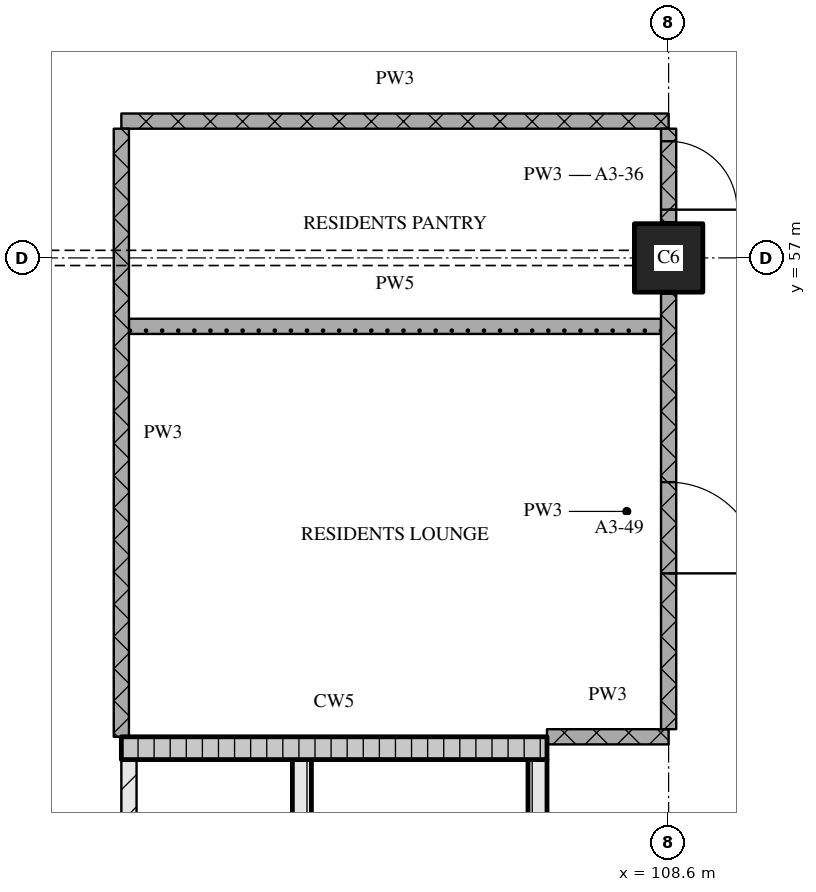
"""IFC4 building model, lengths in metres.
Left out: names, types, materials, properties, quantities, classifications, styles, units other than length and angle.
Written with IfcOpenShell. Run it as: python <this file> out.ifc"""

import sys

from ifc_helpers import new_model, si_unit, direction, frame, frame_2d, origin, origin_2d, place, context, subcontext, project, spatial, rectangle, extrude, element, fill, save


model = new_model("IFC4")
c1 = context("Model", 3, precision=1e-05, world=origin(), true_north=direction((0.0, 1.0)))
c2 = subcontext(c1, "Body", "Model", "MODEL_VIEW")
j1 = project(units=[si_unit("LENGTHUNIT", "METRE"), si_unit("PLANEANGLEUNIT", "RADIAN")], contexts=[c1])
p1 = place(None, origin())
s1 = spatial("IfcSite", under=j1, at=p1, CompositionType="ELEMENT")
p2 = place(p1, origin())
s2 = spatial("IfcBuilding", under=s1, at=p2, CompositionType="ELEMENT")
p3 = place(p2, frame((0.0, 0.0, 58.8)))
s3 = spatial("IfcBuildingStorey", under=s2, at=p3, CompositionType="ELEMENT", Elevation=58.8)
p4 = place(p3, frame((108.6, 57.0, 0.0), z_axis=(0.0, 0.0, 1.0), x_axis=(1.0, 0.0, 0.0)))
e1 = element("IfcColumn", 1, at=p4, inside=s3, PredefinedType="COLUMN", context=c2, shape_type="SweptSolid", body=[
    extrude(rectangle(XDim=0.9, YDim=0.9, at=origin_2d()), origin(), (0.0, 0.0, 1.0), 3.6),
])
p5 = place(p3, frame((101.5, 43.5, 0.0), z_axis=(0.0, 0.0, 1.0), x_axis=(0.0, 1.0, 0.0)))
e2 = element("IfcWall", 2, at=p5, inside=s3, PredefinedType="PARTITIONING", context=c2, shape_type="SweptSolid", body=[
    extrude(rectangle(XDim=6.9, YDim=0.2, at=frame_2d((3.45, 0.0))), origin(), (0.0, 0.0, 1.0), 3.32),
])
p6 = place(p5, frame((1.0, 0.0, 0.0)))
e3 = element("IfcOpeningElement", 3, at=p6, cuts=e2, PredefinedType="OPENING", context=c2, shape_type="SweptSolid", body=[
    extrude(rectangle(XDim=1.0, YDim=2.1, at=frame_2d((0.5, 1.05))), frame((0.0, 0.11, 0.0), z_axis=(0.0, -1.0, 0.0), x_axis=(1.0, 0.0, 0.0)), (0.0, 0.0, 1.0), 0.22),
])
p7 = place(p3, frame((103.775, 43.5, 0.0), z_axis=(0.0, 0.0, 1.0), x_axis=(0.0, 1.0, 0.0)))
e4 = element("IfcWall", 4, at=p7, inside=s3, PredefinedType="SOLIDWALL", context=c2, shape_type="SweptSolid", body=[
    extrude(rectangle(XDim=6.9, YDim=0.25, at=frame_2d((3.45, 0.0))), origin(), (0.0, 0.0, 1.0), 3.32),
])
p8 = place(p7, frame((0.2, 0.0, 0.0)))
e5 = element("IfcOpeningElement", 5, at=p8, cuts=e4, PredefinedType="OPENING", context=c2, shape_type="SweptSolid", body=[
    extrude(rectangle(XDim=1.0, YDim=2.1, at=frame_2d((0.5, 1.05))), frame((0.0, 0.135, 0.0), z_axis=(0.0, -1.0, 0.0), x_axis=(1.0, 0.0, 0.0)), (0.0, 0.0, 1.0), 0.27),
])
p9 = place(p3, frame((106.875, 43.5, 0.0), z_axis=(0.0, 0.0, 1.0), x_axis=(0.0, 1.0, 0.0)))
e6 = element("IfcWall", 6, at=p9, inside=s3, PredefinedType="SOLIDWALL", context=c2, shape_type="SweptSolid", body=[
    extrude(rectangle(XDim=6.9, YDim=0.25, at=frame_2d((3.45, 0.0))), origin(), (0.0, 0.0, 1.0), 3.32),
])
p10 = place(p3, frame((101.4, 50.55, 0.0), z_axis=(0.0, 0.0, 1.0), x_axis=(1.0, 0.0, 0.0)))
e7 = element("IfcWall", 7, at=p10, inside=s3, PredefinedType="SOLIDWALL", context=c2, shape_type="SweptSolid", body=[
    extrude(rectangle(XDim=5.6, YDim=0.3, at=frame_2d((2.8, 0.0))), origin(), (0.0, 0.0, 1.0), 3.32),
])
p11 = place(p3, frame((107.0, 50.7, 0.0), z_axis=(0.0, 0.0, 1.0), x_axis=(1.0, 0.0, 0.0)))
e8 = element("IfcWall", 8, at=p11, inside=s3, PredefinedType="PARTITIONING", context=c2, shape_type="SweptSolid", body=[
    extrude(rectangle(XDim=1.6, YDim=0.2, at=frame_2d((0.8, 0.0))), origin(), (0.0, 0.0, 1.0), 3.32),
])
p12 = place(p3, frame((101.5, 56.1, 0.0), z_axis=(0.0, 0.0, 1.0), x_axis=(1.0, 0.0, 0.0)))
e9 = element("IfcWall", 9, at=p12, inside=s3, PredefinedType="PARTITIONING", context=c2, shape_type="SweptSolid", body=[
    extrude(rectangle(XDim=7.0, YDim=0.2, at=frame_2d((3.5, 0.0))), origin(), (0.0, 0.0, 1.0), 3.32),
])
p13 = place(p3, frame((101.4, 58.8, 0.0), z_axis=(0.0, 0.0, 1.0), x_axis=(1.0, 0.0, 0.0)))
e10 = element("IfcWall", 10, at=p13, inside=s3, PredefinedType="PARTITIONING", context=c2, shape_type="SweptSolid", body=[
    extrude(rectangle(XDim=7.2, YDim=0.2, at=frame_2d((3.6, 0.0))), origin(), (0.0, 0.0, 1.0), 3.32),
])
p14 = place(p3, frame((101.4, 58.7, 0.0), z_axis=(0.0, 0.0, 1.0), x_axis=(0.0, -1.0, 0.0)))
e11 = element("IfcWall", 11, at=p14, inside=s3, PredefinedType="PARTITIONING", context=c2, shape_type="SweptSolid", body=[
    extrude(rectangle(XDim=8.0, YDim=0.2, at=frame_2d((4.0, 0.0))), origin(), (0.0, 0.0, 1.0), 3.32),
])
p15 = place(p3, frame((108.6, 50.8, 0.0), z_axis=(0.0, 0.0, 1.0), x_axis=(0.0, 1.0, 0.0)))
e12 = element("IfcWall", 12, at=p15, inside=s3, PredefinedType="PARTITIONING", context=c2, shape_type="SweptSolid", body=[
    extrude(rectangle(XDim=5.73, YDim=0.2, at=frame_2d((2.865, 0.0))), origin(), (0.0, 0.0, 1.0), 3.32),
])
p16 = place(p15, frame((2.05, 0.0, 0.0)))
e13 = element("IfcOpeningElement", 13, at=p16, cuts=e12, PredefinedType="OPENING", context=c2, shape_type="SweptSolid", body=[
    extrude(rectangle(XDim=1.2, YDim=2.1, at=frame_2d((0.6, 1.05))), frame((0.0, 0.11, 0.0), z_axis=(0.0, -1.0, 0.0), x_axis=(1.0, 0.0, 0.0)), (0.0, 0.0, 1.0), 0.22),
])
p17 = place(p3, frame((108.6, 57.47, 0.0), z_axis=(0.0, 0.0, 1.0), x_axis=(0.0, 1.0, 0.0)))
e14 = element("IfcWall", 14, at=p17, inside=s3, PredefinedType="PARTITIONING", context=c2, shape_type="SweptSolid", body=[
    extrude(rectangle(XDim=1.23, YDim=0.2, at=frame_2d((0.615, 0.0))), origin(), (0.0, 0.0, 1.0), 3.32),
])
p18 = place(p17, frame((0.165, 0.0, 0.0)))
e15 = element("IfcOpeningElement", 15, at=p18, cuts=e14, PredefinedType="OPENING", context=c2, shape_type="SweptSolid", body=[
    extrude(rectangle(XDim=0.9, YDim=2.1, at=frame_2d((0.45, 1.05))), frame((0.0, 0.11, 0.0), z_axis=(0.0, -1.0, 0.0), x_axis=(1.0, 0.0, 0.0)), (0.0, 0.0, 1.0), 0.22),
])
p19 = place(p16, origin())
e16 = element("IfcDoor", 16, at=p19, inside=s3, OperationType="SINGLE_SWING_RIGHT", PredefinedType="DOOR", context=c2, shape_type="SweptSolid", body=[
    extrude(rectangle(XDim=1.2, YDim=2.1, at=frame_2d((0.6, 1.05))), frame((0.0, 0.025, 0.0), z_axis=(0.0, -1.0, 0.0), x_axis=(1.0, 0.0, 0.0)), (0.0, 0.0, 1.0), 0.05),
])
fill(e13, e16)
p20 = place(p18, origin())
e17 = element("IfcDoor", 17, at=p20, inside=s3, OperationType="SINGLE_SWING_RIGHT", PredefinedType="DOOR", context=c2, shape_type="SweptSolid", body=[
    extrude(rectangle(XDim=0.9, YDim=2.1, at=frame_2d((0.45, 1.05))), frame((0.0, 0.025, 0.0), z_axis=(0.0, -1.0, 0.0), x_axis=(1.0, 0.0, 0.0)), (0.0, 0.0, 1.0), 0.05),
])
fill(e15, e17)
save(model, sys.argv[1])
